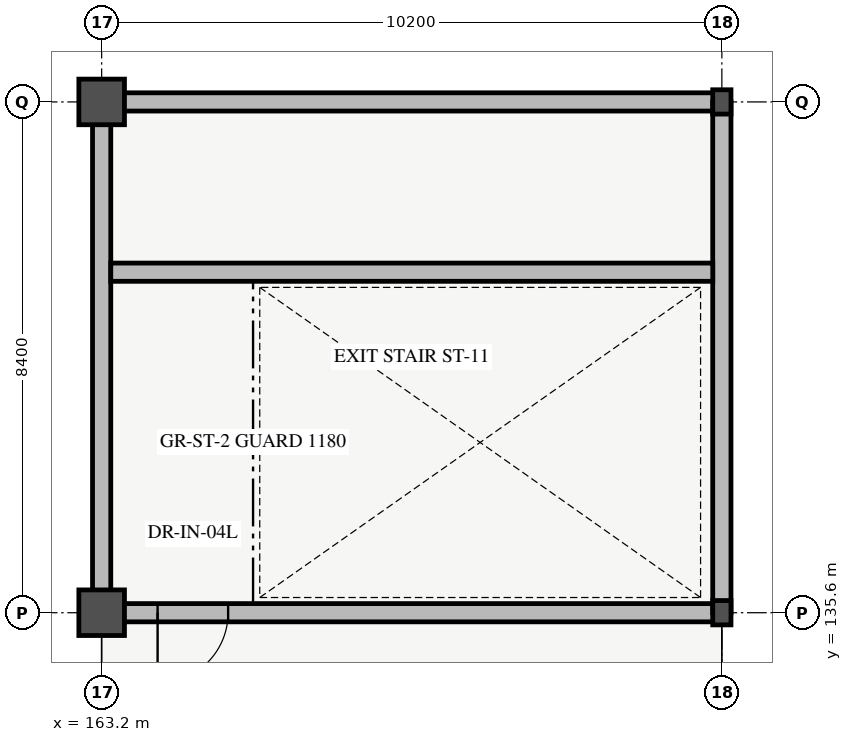
"""IFC4 building model, lengths in metres.
Left out: names, types, materials, properties, quantities, classifications, styles, units other than length and angle.
Written with IfcOpenShell. Run it as: python <this file> out.ifc"""

import sys

from ifc_helpers import new_model, si_unit, direction, frame, frame_2d, origin, origin_2d, place, context, subcontext, project, spatial, rectangle, i_section, extrude, element, fill, save


model = new_model("IFC4")
c1 = context("Model", 3, precision=1e-05, world=origin(), true_north=direction((0.0, 1.0)))
c2 = subcontext(c1, "Body", "Model", "MODEL_VIEW")
j1 = project(units=[si_unit("LENGTHUNIT", "METRE"), si_unit("PLANEANGLEUNIT", "RADIAN")], contexts=[c1])
p1 = place(None, origin())
s1 = spatial("IfcSite", under=j1, at=p1, CompositionType="ELEMENT")
p2 = place(p1, origin())
s2 = spatial("IfcBuilding", under=s1, at=p2, CompositionType="ELEMENT")
p3 = place(p2, frame((0.0, 0.0, 10.8)))
s3 = spatial("IfcBuildingStorey", under=s2, at=p3, CompositionType="ELEMENT", Elevation=10.8)
for number, where, z_axis, x_axis in (
    (1, (163.2, 135.6, 0.0), (0.0, 0.0, 1.0), (1.0, 0.0, 0.0)),
    (2, (163.2, 144.0, 0.0), (0.0, 0.0, 1.0), (1.0, 0.0, 0.0)),
):
    element("IfcColumn", number, at=place(p3, frame(where, z_axis=z_axis, x_axis=x_axis)), inside=s3, PredefinedType="COLUMN", context=c2, shape_type="SweptSolid", body=[
        extrude(rectangle(XDim=0.75, YDim=0.75, at=origin_2d()), origin(), (0.0, 0.0, 1.0), 4.2),
    ])
for number, where, z_axis, x_axis in (
    (3, (173.4, 135.6, 0.0), (0.0, 0.0, 1.0), (1.0, 0.0, 0.0)),
    (4, (173.4, 144.0, 0.0), (0.0, 0.0, 1.0), (1.0, 0.0, 0.0)),
):
    element("IfcColumn", number, at=place(p3, frame(where, z_axis=z_axis, x_axis=x_axis)), inside=s3, PredefinedType="COLUMN", context=c2, shape_type="SweptSolid", body=[
        extrude(i_section(OverallWidth=0.3, OverallDepth=0.4, WebThickness=0.013, FlangeThickness=0.024, FilletRadius=0.027, at=origin_2d()), origin(), (0.0, 0.0, 1.0), 4.2),
    ])
p4 = place(p3, frame((163.2, 135.6, 0.0), z_axis=(0.0, 0.0, 1.0), x_axis=(1.0, 0.0, 0.0)))
e5 = element("IfcWall", 5, at=p4, inside=s3, PredefinedType="SHEAR", context=c2, shape_type="SweptSolid", body=[
    extrude(rectangle(XDim=10.2, YDim=0.3, at=frame_2d((5.1, 0.0))), origin(), (0.0, 0.0, 1.0), 4.2),
])
p5 = place(p4, frame((0.92, 0.0, 0.0)))
e6 = element("IfcOpeningElement", 6, at=p5, cuts=e5, PredefinedType="OPENING", context=c2, shape_type="SweptSolid", body=[
    extrude(rectangle(XDim=1.16, YDim=2.2, at=frame_2d((0.58, 1.1))), frame((0.0, 0.16, 0.0), z_axis=(0.0, -1.0, 0.0), x_axis=(1.0, 0.0, 0.0)), (0.0, 0.0, 1.0), 0.32),
])
p6 = place(p3, frame((163.2, 144.0, 0.0), z_axis=(0.0, 0.0, 1.0), x_axis=(1.0, 0.0, 0.0)))
e7 = element("IfcWall", 7, at=p6, inside=s3, PredefinedType="SHEAR", context=c2, shape_type="SweptSolid", body=[
    extrude(rectangle(XDim=10.2, YDim=0.3, at=frame_2d((5.1, 0.0))), origin(), (0.0, 0.0, 1.0), 4.2),
])
for number, where, z_axis, x_axis in (
    (8, (163.2, 135.6, 0.0), (0.0, 0.0, 1.0), (0.0, 1.0, 0.0)),
    (9, (173.4, 135.6, 0.0), (0.0, 0.0, 1.0), (0.0, 1.0, 0.0)),
):
    element("IfcWall", number, at=place(p3, frame(where, z_axis=z_axis, x_axis=x_axis)), inside=s3, PredefinedType="SHEAR", context=c2, shape_type="SweptSolid", body=[
        extrude(rectangle(XDim=8.4, YDim=0.3, at=frame_2d((4.2, 0.0))), origin(), (0.0, 0.0, 1.0), 4.2),
    ])
p7 = place(p3, frame((163.35, 141.2, 0.0), z_axis=(0.0, 0.0, 1.0), x_axis=(1.0, 0.0, 0.0)))
e10 = element("IfcWall", 10, at=p7, inside=s3, PredefinedType="SHEAR", context=c2, shape_type="SweptSolid", body=[
    extrude(rectangle(XDim=9.9, YDim=0.3, at=frame_2d((4.95, 0.0))), origin(), (0.0, 0.0, 1.0), 4.2),
])
p8 = place(p5, origin())
e11 = element("IfcDoor", 11, at=p8, inside=s3, OperationType="SINGLE_SWING_LEFT", PredefinedType="DOOR", context=c2, shape_type="SweptSolid", body=[
    extrude(rectangle(XDim=1.16, YDim=2.2, at=frame_2d((0.58, 1.1))), frame((0.0, 0.025, 0.0), z_axis=(0.0, -1.0, 0.0), x_axis=(1.0, 0.0, 0.0)), (0.0, 0.0, 1.0), 0.05),
])
fill(e6, e11)
save(model, sys.argv[1])
